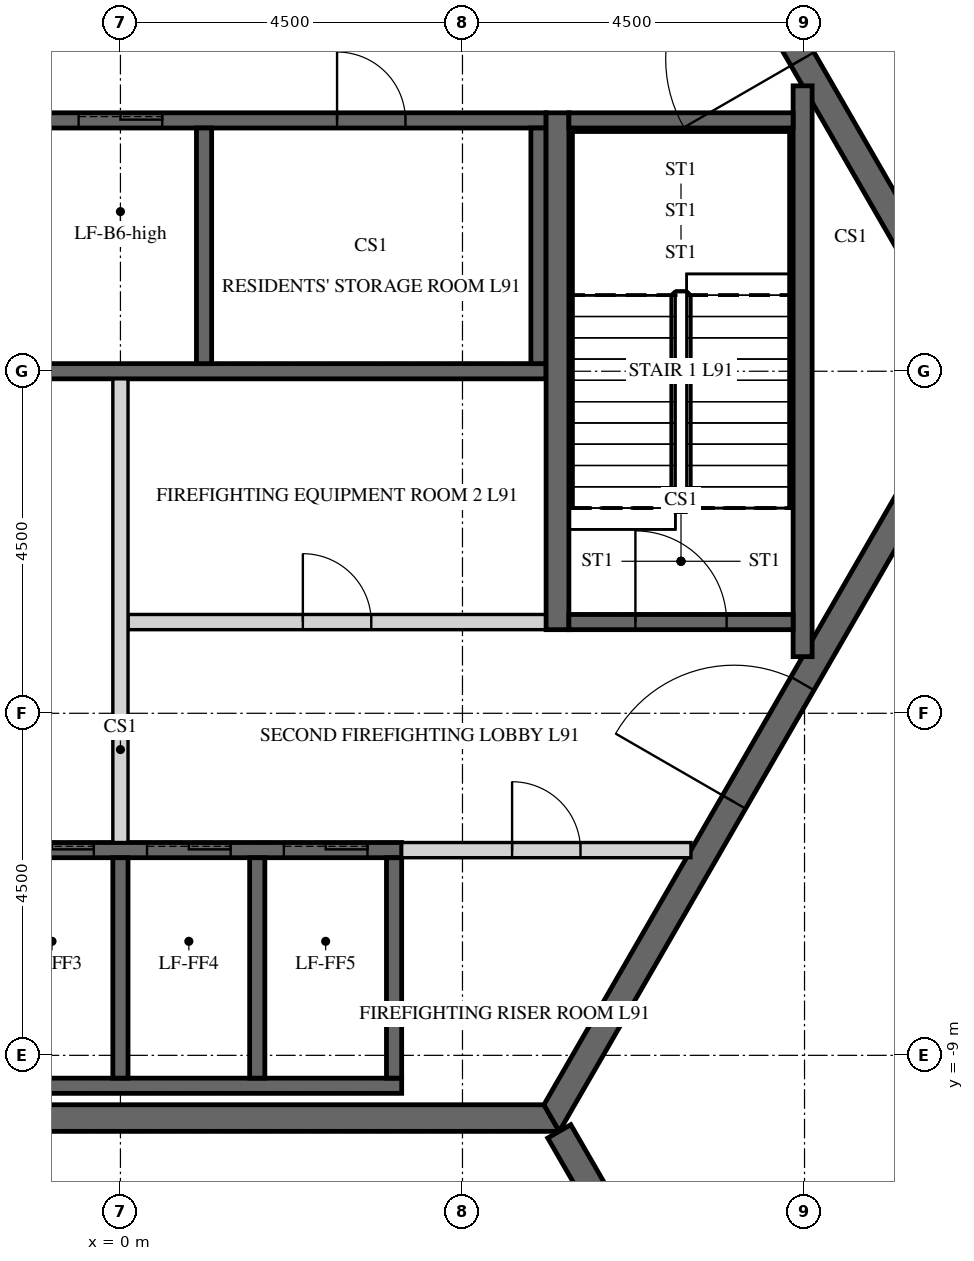
"""IFC4 building model, lengths in metres.
Left out: names, types, materials, properties, quantities, classifications, styles, units other than length and angle.
Written with IfcOpenShell. Run it as: python <this file> out.ifc"""

import sys

from ifc_helpers import new_model, si_unit, direction, frame, frame_2d, origin, place, context, subcontext, project, spatial, polyline, rectangle, outline, extrude, element, fill, save


model = new_model("IFC4")
c1 = context("Model", 3, precision=1e-05, world=origin(), true_north=direction((0.0, 1.0)))
c2 = subcontext(c1, "Body", "Model", "MODEL_VIEW")
j1 = project(units=[si_unit("LENGTHUNIT", "METRE"), si_unit("PLANEANGLEUNIT", "RADIAN")], contexts=[c1])
p1 = place(None, origin())
s1 = spatial("IfcSite", under=j1, at=p1, CompositionType="ELEMENT")
p2 = place(p1, origin())
s2 = spatial("IfcBuilding", under=s1, at=p2, CompositionType="ELEMENT")
p3 = place(p2, frame((0.0, 0.0, 376.8)))
s3 = spatial("IfcBuildingStorey", under=s2, at=p3, CompositionType="ELEMENT", Elevation=376.8)
p4 = place(p3, frame((-5.673, -9.825, -0.5), z_axis=(0.0, 0.0, 1.0), x_axis=(1.0, 0.0, 0.0)))
e1 = element("IfcWall", 1, at=p4, inside=s3, PredefinedType="SHEAR", context=c2, shape_type="SweptSolid", body=[
    extrude(outline(polyline([(-0.101, -0.175), (11.446, -0.175), (11.244, 0.175), (0.101, 0.175), (-0.101, -0.175)])), origin(), (0.0, 0.0, 1.0), 11.7),
])
p5 = place(p3, frame((5.673, -9.825, -0.5), z_axis=(0.0, 0.0, 1.0), x_axis=(0.499995046907, 0.866028263435, 0.0)))
e2 = element("IfcWall", 2, at=p5, inside=s3, PredefinedType="SHEAR", context=c2, shape_type="SweptSolid", body=[
    extrude(outline(polyline([(-0.101, -0.175), (11.446, -0.175), (11.244, 0.175), (0.101, 0.175), (-0.101, -0.175)])), origin(), (0.0, 0.0, 1.0), 11.7),
])
p6 = place(p5, frame((4.801, 0.0, 0.5)))
e3 = element("IfcOpeningElement", 3, at=p6, cuts=e2, PredefinedType="OPENING", context=c2, shape_type="SweptSolid", body=[
    extrude(rectangle(XDim=1.8, YDim=2.4, at=frame_2d((0.9, 1.2))), frame((0.0, 0.185, 0.0), z_axis=(0.0, -1.0, 0.0), x_axis=(1.0, 0.0, 0.0)), (0.0, 0.0, 1.0), 0.37),
])
p7 = place(p3, frame((11.345, 0.0, -0.5), z_axis=(0.0, 0.0, 1.0), x_axis=(-0.499995046907, 0.866028263435, 0.0)))
e4 = element("IfcWall", 4, at=p7, inside=s3, PredefinedType="SHEAR", context=c2, shape_type="SweptSolid", body=[
    extrude(outline(polyline([(-0.101, -0.175), (11.446, -0.175), (11.244, 0.175), (0.101, 0.175), (-0.101, -0.175)])), origin(), (0.0, 0.0, 1.0), 11.7),
])
p8 = place(p7, frame((4.744, 0.0, 0.5)))
e5 = element("IfcOpeningElement", 5, at=p8, cuts=e4, PredefinedType="OPENING", context=c2, shape_type="SweptSolid", body=[
    extrude(rectangle(XDim=1.8, YDim=2.4, at=frame_2d((0.9, 1.2))), frame((0.0, 0.185, 0.0), z_axis=(0.0, -1.0, 0.0), x_axis=(1.0, 0.0, 0.0)), (0.0, 0.0, 1.0), 0.37),
])
p9 = place(p3, frame((5.773, -10.0, -0.5), z_axis=(0.0, 0.0, 1.0), x_axis=(0.500007911273, -0.866020836161, 0.0)))
e6 = element("IfcWall", 6, at=p9, inside=s3, PredefinedType="SHEAR", context=c2, shape_type="SweptSolid", body=[
    extrude(rectangle(XDim=14.51, YDim=0.35, at=frame_2d((7.255, 0.0))), origin(), (0.0, 0.0, 1.0), 11.7),
])
p10 = place(p9, frame((6.355, 0.0, 0.5)))
e7 = element("IfcOpeningElement", 7, at=p10, cuts=e6, PredefinedType="OPENING", context=c2, shape_type="SweptSolid", body=[
    extrude(rectangle(XDim=1.8, YDim=2.4, at=frame_2d((0.9, 1.2))), frame((0.0, 0.185, 0.0), z_axis=(0.0, -1.0, 0.0), x_axis=(1.0, 0.0, 0.0)), (0.0, 0.0, 1.0), 0.37),
])
p11 = place(p3, frame((-5.6, 3.3, -0.25), z_axis=(0.0, 0.0, 1.0), x_axis=(1.0, 0.0, 0.0)))
e8 = element("IfcWall", 8, at=p11, inside=s3, PredefinedType="SHEAR", context=c2, shape_type="SweptSolid", body=[
    extrude(rectangle(XDim=11.2, YDim=0.2, at=frame_2d((5.6, 0.0))), origin(), (0.0, 0.0, 1.0), 11.45),
])
p12 = place(p11, frame((8.45, 0.0, 0.25)))
e9 = element("IfcOpeningElement", 9, at=p12, cuts=e8, PredefinedType="OPENING", context=c2, shape_type="SweptSolid", body=[
    extrude(rectangle(XDim=0.9, YDim=2.1, at=frame_2d((0.45, 1.05))), frame((0.0, 0.11, 0.0), z_axis=(0.0, -1.0, 0.0), x_axis=(1.0, 0.0, 0.0)), (0.0, 0.0, 1.0), 0.22),
])
p13 = place(p11, frame((0.65, 0.0, 0.25)))
e10 = element("IfcOpeningElement", 10, at=p13, cuts=e8, PredefinedType="OPENING", context=c2, shape_type="SweptSolid", body=[
    extrude(rectangle(XDim=1.1, YDim=2.1, at=frame_2d((0.55, 1.05))), frame((0.0, 0.11, 0.0), z_axis=(0.0, -1.0, 0.0), x_axis=(1.0, 0.0, 0.0)), (0.0, 0.0, 1.0), 0.22),
])
p14 = place(p11, frame((2.85, 0.0, 0.25)))
e11 = element("IfcOpeningElement", 11, at=p14, cuts=e8, PredefinedType="OPENING", context=c2, shape_type="SweptSolid", body=[
    extrude(rectangle(XDim=1.1, YDim=2.1, at=frame_2d((0.55, 1.05))), frame((0.0, 0.11, 0.0), z_axis=(0.0, -1.0, 0.0), x_axis=(1.0, 0.0, 0.0)), (0.0, 0.0, 1.0), 0.22),
])
p15 = place(p11, frame((5.05, 0.0, 0.25)))
e12 = element("IfcOpeningElement", 12, at=p15, cuts=e8, PredefinedType="OPENING", context=c2, shape_type="SweptSolid", body=[
    extrude(rectangle(XDim=1.1, YDim=2.1, at=frame_2d((0.55, 1.05))), frame((0.0, 0.11, 0.0), z_axis=(0.0, -1.0, 0.0), x_axis=(1.0, 0.0, 0.0)), (0.0, 0.0, 1.0), 0.22),
])
p16 = place(p3, frame((-5.6, 0.0, -0.25), z_axis=(0.0, 0.0, 1.0), x_axis=(1.0, 0.0, 0.0)))
e13 = element("IfcWall", 13, at=p16, inside=s3, PredefinedType="SHEAR", context=c2, shape_type="SweptSolid", body=[
    extrude(rectangle(XDim=11.2, YDim=0.2, at=frame_2d((5.6, 0.0))), origin(), (0.0, 0.0, 1.0), 11.45),
])
for number, where, z_axis, x_axis in (
    (14, (1.1, 0.1, -0.25), (0.0, 0.0, 1.0), (0.0, 1.0, 0.0)),
    (15, (5.5, 0.1, -0.25), (0.0, 0.0, 1.0), (0.0, 1.0, 0.0)),
):
    element("IfcWall", number, at=place(p3, frame(where, z_axis=z_axis, x_axis=x_axis)), inside=s3, PredefinedType="SHEAR", context=c2, shape_type="SweptSolid", body=[
        extrude(rectangle(XDim=3.1, YDim=0.2, at=frame_2d((1.55, 0.0))), origin(), (0.0, 0.0, 1.0), 11.45),
    ])
p17 = place(p3, frame((-5.5, -6.3, -0.25), z_axis=(0.0, 0.0, 1.0), x_axis=(1.0, 0.0, 0.0)))
e16 = element("IfcWall", 16, at=p17, inside=s3, PredefinedType="SHEAR", context=c2, shape_type="SweptSolid", body=[
    extrude(rectangle(XDim=9.2, YDim=0.2, at=frame_2d((4.6, 0.0))), origin(), (0.0, 0.0, 1.0), 11.45),
])
p18 = place(p17, frame((0.45, 0.0, 0.25)))
e17 = element("IfcOpeningElement", 17, at=p18, cuts=e16, PredefinedType="OPENING", context=c2, shape_type="SweptSolid", body=[
    extrude(rectangle(XDim=1.1, YDim=2.1, at=frame_2d((0.55, 1.05))), frame((0.0, 0.11, 0.0), z_axis=(0.0, -1.0, 0.0), x_axis=(1.0, 0.0, 0.0)), (0.0, 0.0, 1.0), 0.22),
])
p19 = place(p17, frame((2.25, 0.0, 0.25)))
e18 = element("IfcOpeningElement", 18, at=p19, cuts=e16, PredefinedType="OPENING", context=c2, shape_type="SweptSolid", body=[
    extrude(rectangle(XDim=1.1, YDim=2.1, at=frame_2d((0.55, 1.05))), frame((0.0, 0.11, 0.0), z_axis=(0.0, -1.0, 0.0), x_axis=(1.0, 0.0, 0.0)), (0.0, 0.0, 1.0), 0.22),
])
p20 = place(p17, frame((4.05, 0.0, 0.25)))
e19 = element("IfcOpeningElement", 19, at=p20, cuts=e16, PredefinedType="OPENING", context=c2, shape_type="SweptSolid", body=[
    extrude(rectangle(XDim=1.1, YDim=2.1, at=frame_2d((0.55, 1.05))), frame((0.0, 0.11, 0.0), z_axis=(0.0, -1.0, 0.0), x_axis=(1.0, 0.0, 0.0)), (0.0, 0.0, 1.0), 0.22),
])
p21 = place(p17, frame((5.85, 0.0, 0.25)))
e20 = element("IfcOpeningElement", 20, at=p21, cuts=e16, PredefinedType="OPENING", context=c2, shape_type="SweptSolid", body=[
    extrude(rectangle(XDim=1.1, YDim=2.1, at=frame_2d((0.55, 1.05))), frame((0.0, 0.11, 0.0), z_axis=(0.0, -1.0, 0.0), x_axis=(1.0, 0.0, 0.0)), (0.0, 0.0, 1.0), 0.22),
])
p22 = place(p17, frame((7.65, 0.0, 0.25)))
e21 = element("IfcOpeningElement", 21, at=p22, cuts=e16, PredefinedType="OPENING", context=c2, shape_type="SweptSolid", body=[
    extrude(rectangle(XDim=1.1, YDim=2.1, at=frame_2d((0.55, 1.05))), frame((0.0, 0.11, 0.0), z_axis=(0.0, -1.0, 0.0), x_axis=(1.0, 0.0, 0.0)), (0.0, 0.0, 1.0), 0.22),
])
p23 = place(p3, frame((-5.5, -9.4, -0.25), z_axis=(0.0, 0.0, 1.0), x_axis=(1.0, 0.0, 0.0)))
e22 = element("IfcWall", 22, at=p23, inside=s3, PredefinedType="SHEAR", context=c2, shape_type="SweptSolid", body=[
    extrude(rectangle(XDim=9.2, YDim=0.2, at=frame_2d((4.6, 0.0))), origin(), (0.0, 0.0, 1.0), 11.45),
])
for number, where, z_axis, x_axis in (
    (23, (0.0, -9.3, -0.25), (0.0, 0.0, 1.0), (0.0, 1.0, 0.0)),
    (24, (1.8, -9.3, -0.25), (0.0, 0.0, 1.0), (0.0, 1.0, 0.0)),
    (25, (3.6, -9.3, -0.25), (0.0, 0.0, 1.0), (0.0, 1.0, 0.0)),
):
    element("IfcWall", number, at=place(p3, frame(where, z_axis=z_axis, x_axis=x_axis)), inside=s3, PredefinedType="SHEAR", context=c2, shape_type="SweptSolid", body=[
        extrude(rectangle(XDim=2.9, YDim=0.2, at=frame_2d((1.45, 0.0))), origin(), (0.0, 0.0, 1.0), 11.45),
    ])
p24 = place(p3, frame((0.1, -3.3, 0.0), z_axis=(0.0, 0.0, 1.0), x_axis=(1.0, 0.0, 0.0)))
e26 = element("IfcWall", 26, at=p24, inside=s3, PredefinedType="PARTITIONING", context=c2, shape_type="SweptSolid", body=[
    extrude(rectangle(XDim=5.5, YDim=0.2, at=frame_2d((2.75, 0.0))), origin(), (0.0, 0.0, 1.0), 11.2),
])
p25 = place(p24, frame((2.3, 0.0, 0.0)))
e27 = element("IfcOpeningElement", 27, at=p25, cuts=e26, PredefinedType="OPENING", context=c2, shape_type="SweptSolid", body=[
    extrude(rectangle(XDim=0.9, YDim=2.1, at=frame_2d((0.45, 1.05))), frame((0.0, 0.11, 0.0), z_axis=(0.0, -1.0, 0.0), x_axis=(1.0, 0.0, 0.0)), (0.0, 0.0, 1.0), 0.22),
])
p26 = place(p3, frame((0.0, -6.2, 0.0), z_axis=(0.0, 0.0, 1.0), x_axis=(0.0, 1.0, 0.0)))
e28 = element("IfcWall", 28, at=p26, inside=s3, PredefinedType="PARTITIONING", context=c2, shape_type="SweptSolid", body=[
    extrude(rectangle(XDim=6.1, YDim=0.2, at=frame_2d((3.05, 0.0))), origin(), (0.0, 0.0, 1.0), 11.2),
])
p27 = place(p3, frame((3.7, -6.3, 0.0), z_axis=(0.0, 0.0, 1.0), x_axis=(1.0, 0.0, 0.0)))
e29 = element("IfcWall", 29, at=p27, inside=s3, PredefinedType="PARTITIONING", context=c2, shape_type="SweptSolid", body=[
    extrude(rectangle(XDim=3.806, YDim=0.2, at=frame_2d((1.903, 0.0))), origin(), (0.0, 0.0, 1.0), 11.2),
])
p28 = place(p27, frame((1.453, 0.0, 0.0)))
e30 = element("IfcOpeningElement", 30, at=p28, cuts=e29, PredefinedType="OPENING", context=c2, shape_type="SweptSolid", body=[
    extrude(rectangle(XDim=0.9, YDim=2.1, at=frame_2d((0.45, 1.05))), frame((0.0, 0.11, 0.0), z_axis=(0.0, -1.0, 0.0), x_axis=(1.0, 0.0, 0.0)), (0.0, 0.0, 1.0), 0.22),
])
p29 = place(p3, frame((5.75, -3.4, -0.25), z_axis=(0.0, 0.0, 1.0), x_axis=(0.0, 1.0, 0.0)))
e31 = element("IfcWall", 31, at=p29, inside=s3, PredefinedType="SHEAR", context=c2, shape_type="SweptSolid", body=[
    extrude(rectangle(XDim=6.8, YDim=0.3, at=frame_2d((3.4, 0.0))), origin(), (0.0, 0.0, 1.0), 11.45),
])
p30 = place(p3, frame((8.975, -3.755, -0.25), z_axis=(0.0, 0.0, 1.0), x_axis=(0.0, 1.0, 0.0)))
e32 = element("IfcWall", 32, at=p30, inside=s3, PredefinedType="SHEAR", context=c2, shape_type="SweptSolid", body=[
    extrude(rectangle(XDim=7.51, YDim=0.25, at=frame_2d((3.755, 0.0))), origin(), (0.0, 0.0, 1.0), 11.45),
])
p31 = place(p3, frame((5.9, 3.3, -0.25), z_axis=(0.0, 0.0, 1.0), x_axis=(1.0, 0.0, 0.0)))
e33 = element("IfcWall", 33, at=p31, inside=s3, PredefinedType="SHEAR", context=c2, shape_type="SweptSolid", body=[
    extrude(rectangle(XDim=2.95, YDim=0.2, at=frame_2d((1.475, 0.0))), origin(), (0.0, 0.0, 1.0), 11.45),
])
p32 = place(p3, frame((5.9, -3.3, -0.25), z_axis=(0.0, 0.0, 1.0), x_axis=(1.0, 0.0, 0.0)))
e34 = element("IfcWall", 34, at=p32, inside=s3, PredefinedType="SHEAR", context=c2, shape_type="SweptSolid", body=[
    extrude(rectangle(XDim=2.95, YDim=0.2, at=frame_2d((1.475, 0.0))), origin(), (0.0, 0.0, 1.0), 11.45),
])
p33 = place(p32, frame((0.875, 0.0, 0.25)))
e35 = element("IfcOpeningElement", 35, at=p33, cuts=e34, PredefinedType="OPENING", context=c2, shape_type="SweptSolid", body=[
    extrude(rectangle(XDim=1.2, YDim=2.4, at=frame_2d((0.6, 1.2))), frame((0.0, 0.11, 0.0), z_axis=(0.0, -1.0, 0.0), x_axis=(1.0, 0.0, 0.0)), (0.0, 0.0, 1.0), 0.22),
])
p34 = place(p3, frame((20.092, 0.0, 0.0), z_axis=(0.0, 0.0, 1.0), x_axis=(-0.500005791521, -0.866022060022, 0.0)))
e36 = element("IfcWall", 36, at=p34, inside=s3, PredefinedType="PARTITIONING", context=c2, shape_type="SweptSolid", body=[
    extrude(rectangle(XDim=19.89, YDim=0.15, at=frame_2d((9.945, 0.0))), origin(), (0.0, 0.0, 1.0), 11.2),
])
p35 = place(p34, frame((9.045, 0.0, 0.0)))
e37 = element("IfcOpeningElement", 37, at=p35, cuts=e36, PredefinedType="OPENING", context=c2, shape_type="SweptSolid", body=[
    extrude(rectangle(XDim=1.8, YDim=2.1, at=frame_2d((0.9, 1.05))), frame((0.0, 0.085, 0.0), z_axis=(0.0, -1.0, 0.0), x_axis=(1.0, 0.0, 0.0)), (0.0, 0.0, 1.0), 0.17),
])
p36 = place(p8, origin())
e38 = element("IfcDoor", 38, at=p36, inside=s3, OperationType="DOUBLE_DOOR_SINGLE_SWING", PredefinedType="DOOR", context=c2, shape_type="SweptSolid", body=[
    extrude(rectangle(XDim=1.8, YDim=2.4, at=frame_2d((0.9, 1.2))), frame((0.0, 0.025, 0.0), z_axis=(0.0, -1.0, 0.0), x_axis=(1.0, 0.0, 0.0)), (0.0, 0.0, 1.0), 0.05),
])
fill(e5, e38)
p37 = place(p6, origin())
e39 = element("IfcDoor", 39, at=p37, inside=s3, OperationType="DOUBLE_DOOR_SINGLE_SWING", PredefinedType="DOOR", context=c2, shape_type="SweptSolid", body=[
    extrude(rectangle(XDim=1.8, YDim=2.4, at=frame_2d((0.9, 1.2))), frame((0.0, 0.025, 0.0), z_axis=(0.0, -1.0, 0.0), x_axis=(1.0, 0.0, 0.0)), (0.0, 0.0, 1.0), 0.05),
])
fill(e3, e39)
p38 = place(p25, origin())
e40 = element("IfcDoor", 40, at=p38, inside=s3, OperationType="SINGLE_SWING_LEFT", PredefinedType="DOOR", context=c2, shape_type="SweptSolid", body=[
    extrude(rectangle(XDim=0.9, YDim=2.1, at=frame_2d((0.45, 1.05))), frame((0.0, 0.025, 0.0), z_axis=(0.0, -1.0, 0.0), x_axis=(1.0, 0.0, 0.0)), (0.0, 0.0, 1.0), 0.05),
])
fill(e27, e40)
p39 = place(p28, origin())
e41 = element("IfcDoor", 41, at=p39, inside=s3, OperationType="SINGLE_SWING_LEFT", PredefinedType="DOOR", context=c2, shape_type="SweptSolid", body=[
    extrude(rectangle(XDim=0.9, YDim=2.1, at=frame_2d((0.45, 1.05))), frame((0.0, 0.025, 0.0), z_axis=(0.0, -1.0, 0.0), x_axis=(1.0, 0.0, 0.0)), (0.0, 0.0, 1.0), 0.05),
])
fill(e30, e41)
p40 = place(p12, origin())
e42 = element("IfcDoor", 42, at=p40, inside=s3, OperationType="SINGLE_SWING_LEFT", PredefinedType="DOOR", context=c2, shape_type="SweptSolid", body=[
    extrude(rectangle(XDim=0.9, YDim=2.1, at=frame_2d((0.45, 1.05))), frame((0.0, 0.025, 0.0), z_axis=(0.0, -1.0, 0.0), x_axis=(1.0, 0.0, 0.0)), (0.0, 0.0, 1.0), 0.05),
])
fill(e9, e42)
p41 = place(p33, origin())
e43 = element("IfcDoor", 43, at=p41, inside=s3, OperationType="SINGLE_SWING_LEFT", PredefinedType="DOOR", context=c2, shape_type="SweptSolid", body=[
    extrude(rectangle(XDim=1.2, YDim=2.4, at=frame_2d((0.6, 1.2))), frame((0.0, 0.025, 0.0), z_axis=(0.0, -1.0, 0.0), x_axis=(1.0, 0.0, 0.0)), (0.0, 0.0, 1.0), 0.05),
])
fill(e35, e43)
p42 = place(p15, origin())
e44 = element("IfcDoor", 44, at=p42, inside=s3, OperationType="SLIDING_TO_LEFT", PredefinedType="DOOR", context=c2, shape_type="SweptSolid", body=[
    extrude(rectangle(XDim=1.1, YDim=2.1, at=frame_2d((0.55, 1.05))), frame((0.0, 0.025, 0.0), z_axis=(0.0, -1.0, 0.0), x_axis=(1.0, 0.0, 0.0)), (0.0, 0.0, 1.0), 0.05),
])
fill(e12, e44)
p43 = place(p20, origin())
e45 = element("IfcDoor", 45, at=p43, inside=s3, OperationType="SLIDING_TO_LEFT", PredefinedType="DOOR", context=c2, shape_type="SweptSolid", body=[
    extrude(rectangle(XDim=1.1, YDim=2.1, at=frame_2d((0.55, 1.05))), frame((0.0, 0.025, 0.0), z_axis=(0.0, -1.0, 0.0), x_axis=(1.0, 0.0, 0.0)), (0.0, 0.0, 1.0), 0.05),
])
fill(e19, e45)
p44 = place(p21, origin())
e46 = element("IfcDoor", 46, at=p44, inside=s3, OperationType="SLIDING_TO_LEFT", PredefinedType="DOOR", context=c2, shape_type="SweptSolid", body=[
    extrude(rectangle(XDim=1.1, YDim=2.1, at=frame_2d((0.55, 1.05))), frame((0.0, 0.025, 0.0), z_axis=(0.0, -1.0, 0.0), x_axis=(1.0, 0.0, 0.0)), (0.0, 0.0, 1.0), 0.05),
])
fill(e20, e46)
p45 = place(p22, origin())
e47 = element("IfcDoor", 47, at=p45, inside=s3, OperationType="SLIDING_TO_LEFT", PredefinedType="DOOR", context=c2, shape_type="SweptSolid", body=[
    extrude(rectangle(XDim=1.1, YDim=2.1, at=frame_2d((0.55, 1.05))), frame((0.0, 0.025, 0.0), z_axis=(0.0, -1.0, 0.0), x_axis=(1.0, 0.0, 0.0)), (0.0, 0.0, 1.0), 0.05),
])
fill(e21, e47)
save(model, sys.argv[1])
